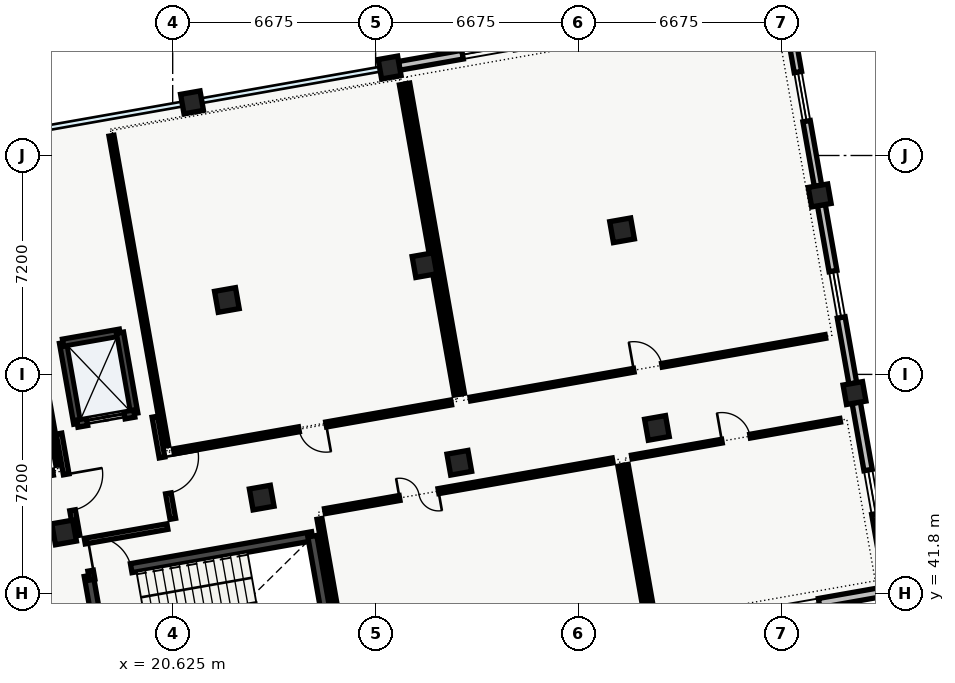
"""IFC4 building model, lengths in metres.
Left out: names, types, materials, properties, quantities, classifications, styles, units other than length and angle.
Written with IfcOpenShell. Run it as: python <this file> out.ifc"""

import sys

from ifc_helpers import new_model, si_unit, direction, frame, frame_2d, origin, origin_2d, place, context, subcontext, project, spatial, rectangle, extrude, element, fill, save


model = new_model("IFC4")
c1 = context("Model", 3, precision=1e-05, world=origin(), true_north=direction((0.0, 1.0)))
c2 = subcontext(c1, "Body", "Model", "MODEL_VIEW")
j1 = project(units=[si_unit("LENGTHUNIT", "METRE"), si_unit("PLANEANGLEUNIT", "RADIAN")], contexts=[c1])
p1 = place(None, origin())
s1 = spatial("IfcSite", under=j1, at=p1, CompositionType="ELEMENT")
p2 = place(p1, origin())
s2 = spatial("IfcBuilding", under=s1, at=p2, CompositionType="ELEMENT")
p3 = place(p2, frame((0.0, 0.0, 14.1)))
s3 = spatial("IfcBuildingStorey", under=s2, at=p3, CompositionType="ELEMENT", Elevation=14.1)
for number, where, z_axis, x_axis in (
    (1, (17.053, 43.802, 0.0), (0.0, 0.0, 1.0), (0.985, 0.174, 0.0)),
    (2, (23.553, 44.948, 0.0), (0.0, 0.0, 1.0), (0.985, 0.174, 0.0)),
    (3, (22.407, 51.448, 0.0), (0.0, 0.0, 1.0), (0.985, 0.174, 0.0)),
):
    element("IfcColumn", number, at=place(p3, frame(where, z_axis=z_axis, x_axis=x_axis)), inside=s3, PredefinedType="COLUMN", context=c2, shape_type="SweptSolid", body=[
        extrude(rectangle(XDim=0.7, YDim=0.7, at=origin_2d()), origin(), (0.0, 0.0, 1.0), 4.31),
    ])
p4 = place(p3, frame((21.261, 57.948, 0.0), z_axis=(0.0, 0.0, 1.0), x_axis=(0.984807753012, 0.173648177667, 0.0)))
e4 = element("IfcColumn", 4, at=p4, inside=s3, PredefinedType="COLUMN", context=c2, shape_type="SweptSolid", body=[
    extrude(rectangle(XDim=0.65, YDim=0.65, at=origin_2d()), origin(), (0.0, 0.0, 1.0), 4.31),
])
for number, where, z_axis, x_axis in (
    (5, (30.053, 46.094, 0.0), (0.0, 0.0, 1.0), (0.985, 0.174, 0.0)),
    (6, (28.907, 52.594, 0.0), (0.0, 0.0, 1.0), (0.985, 0.174, 0.0)),
):
    element("IfcColumn", number, at=place(p3, frame(where, z_axis=z_axis, x_axis=x_axis)), inside=s3, PredefinedType="COLUMN", context=c2, shape_type="SweptSolid", body=[
        extrude(rectangle(XDim=0.7, YDim=0.7, at=origin_2d()), origin(), (0.0, 0.0, 1.0), 4.31),
    ])
p5 = place(p3, frame((27.761, 59.094, 0.0), z_axis=(0.0, 0.0, 1.0), x_axis=(0.984807753012, 0.173648177667, 0.0)))
e7 = element("IfcColumn", 7, at=p5, inside=s3, PredefinedType="COLUMN", context=c2, shape_type="SweptSolid", body=[
    extrude(rectangle(XDim=0.65, YDim=0.65, at=origin_2d()), origin(), (0.0, 0.0, 1.0), 4.31),
])
for number, where, z_axis, x_axis in (
    (8, (36.552, 47.24, 0.0), (0.0, 0.0, 1.0), (0.985, 0.174, 0.0)),
    (9, (35.406, 53.74, 0.0), (0.0, 0.0, 1.0), (0.985, 0.174, 0.0)),
):
    element("IfcColumn", number, at=place(p3, frame(where, z_axis=z_axis, x_axis=x_axis)), inside=s3, PredefinedType="COLUMN", context=c2, shape_type="SweptSolid", body=[
        extrude(rectangle(XDim=0.7, YDim=0.7, at=origin_2d()), origin(), (0.0, 0.0, 1.0), 4.31),
    ])
for number, where, z_axis, x_axis in (
    (10, (43.052, 48.386, 0.0), (0.0, 0.0, 1.0), (0.985, 0.174, 0.0)),
    (11, (41.906, 54.886, 0.0), (0.0, 0.0, 1.0), (0.985, 0.174, 0.0)),
):
    element("IfcColumn", number, at=place(p3, frame(where, z_axis=z_axis, x_axis=x_axis)), inside=s3, PredefinedType="COLUMN", context=c2, shape_type="SweptSolid", body=[
        extrude(rectangle(XDim=0.65, YDim=0.65, at=origin_2d()), origin(), (0.0, 0.0, 1.0), 4.31),
    ])
p6 = place(p3, frame((28.076, 59.149, 0.0), z_axis=(0.0, 0.0, 1.0), x_axis=(0.98480829201, 0.173645120828, 0.0)))
e12 = element("IfcWall", 12, at=p6, inside=s3, PredefinedType="STANDARD", context=c2, shape_type="SweptSolid", body=[
    extrude(rectangle(XDim=5.96, YDim=0.29, at=frame_2d((2.98, 0.0))), origin(), (0.0, 0.0, 1.0), 3.795),
])
p7 = place(p6, frame((2.115, 0.0, 0.95)))
e13 = element("IfcOpeningElement", 13, at=p7, cuts=e12, PredefinedType="OPENING", context=c2, shape_type="SweptSolid", body=[
    extrude(rectangle(XDim=1.73, YDim=1.36, at=frame_2d((0.865, 0.68))), frame((0.0, 0.145, 0.0), z_axis=(0.0, -1.0, 0.0), x_axis=(1.0, 0.0, 0.0)), (0.0, 0.0, 1.0), 0.29),
])
p8 = place(p3, frame((40.816, 61.071, 0.0), z_axis=(0.0, 0.0, 1.0), x_axis=(0.173645120828, -0.98480829201, 0.0)))
e14 = element("IfcWall", 14, at=p8, inside=s3, PredefinedType="STANDARD", context=c2, shape_type="SweptSolid", body=[
    extrude(rectangle(XDim=5.96, YDim=0.245, at=frame_2d((2.98, 0.0))), origin(), (0.0, 0.0, 1.0), 3.795),
])
p9 = place(p8, frame((2.16, 0.0, 0.95)))
e15 = element("IfcOpeningElement", 15, at=p9, cuts=e14, PredefinedType="OPENING", context=c2, shape_type="SweptSolid", body=[
    extrude(rectangle(XDim=1.64, YDim=1.48, at=frame_2d((0.82, 0.74))), frame((0.0, 0.123, 0.0), z_axis=(0.0, -1.0, 0.0), x_axis=(1.0, 0.0, 0.0)), (0.0, 0.0, 1.0), 0.245),
])
p10 = place(p3, frame((41.962, 54.571, 0.0), z_axis=(0.0, 0.0, 1.0), x_axis=(0.173645120828, -0.98480829201, 0.0)))
e16 = element("IfcWall", 16, at=p10, inside=s3, PredefinedType="STANDARD", context=c2, shape_type="SweptSolid", body=[
    extrude(rectangle(XDim=5.96, YDim=0.26, at=frame_2d((2.98, 0.0))), origin(), (0.0, 0.0, 1.0), 3.795),
])
p11 = place(p10, frame((2.205, 0.0, 0.95)))
e17 = element("IfcOpeningElement", 17, at=p11, cuts=e16, PredefinedType="OPENING", context=c2, shape_type="SweptSolid", body=[
    extrude(rectangle(XDim=1.55, YDim=1.46, at=frame_2d((0.775, 0.73))), frame((0.0, 0.13, 0.0), z_axis=(0.0, -1.0, 0.0), x_axis=(1.0, 0.0, 0.0)), (0.0, 0.0, 1.0), 0.26),
])
p12 = place(p3, frame((43.108, 48.071, 0.0), z_axis=(0.0, 0.0, 1.0), x_axis=(0.173645120828, -0.98480829201, 0.0)))
e18 = element("IfcWall", 18, at=p12, inside=s3, PredefinedType="STANDARD", context=c2, shape_type="SweptSolid", body=[
    extrude(rectangle(XDim=5.96, YDim=0.275, at=frame_2d((2.98, 0.0))), origin(), (0.0, 0.0, 1.0), 3.795),
])
p13 = place(p12, frame((2.25, 0.0, 0.95)))
e19 = element("IfcOpeningElement", 19, at=p13, cuts=e18, PredefinedType="OPENING", context=c2, shape_type="SweptSolid", body=[
    extrude(rectangle(XDim=1.46, YDim=1.44, at=frame_2d((0.73, 0.72))), frame((0.0, 0.137, 0.0), z_axis=(0.0, -1.0, 0.0), x_axis=(1.0, 0.0, 0.0)), (0.0, 0.0, 1.0), 0.275),
])
p14 = place(p3, frame((43.883, 41.831, 0.0), z_axis=(0.0, 0.0, 1.0), x_axis=(-0.98480829201, -0.173645120828, 0.0)))
e20 = element("IfcWall", 20, at=p14, inside=s3, PredefinedType="STANDARD", context=c2, shape_type="SweptSolid", body=[
    extrude(rectangle(XDim=5.96, YDim=0.305, at=frame_2d((2.98, 0.0))), origin(), (0.0, 0.0, 1.0), 3.795),
])
p15 = place(p14, frame((2.025, 0.0, 0.95)))
e21 = element("IfcOpeningElement", 21, at=p15, cuts=e20, PredefinedType="OPENING", context=c2, shape_type="SweptSolid", body=[
    extrude(rectangle(XDim=1.91, YDim=1.4, at=frame_2d((0.955, 0.7))), frame((0.0, 0.152, 0.0), z_axis=(0.0, -1.0, 0.0), x_axis=(1.0, 0.0, 0.0)), (0.0, 0.0, 1.0), 0.305),
])
p16 = place(p3, frame((18.567, 38.383, 0.0), z_axis=(0.0, 0.0, 1.0), x_axis=(-0.173606946886, 0.984815022221, 0.0)))
e22 = element("IfcWall", 22, at=p16, inside=s3, PredefinedType="SHEAR", context=c2, shape_type="SweptSolid", body=[
    extrude(rectangle(XDim=4.06, YDim=0.3, at=frame_2d((2.03, 0.0))), origin(), (0.0, 0.0, 1.0), 4.28),
])
p17 = place(p3, frame((17.863, 42.381, 0.0), z_axis=(0.0, 0.0, 1.0), x_axis=(0.984808225754, 0.173645496596, 0.0)))
e23 = element("IfcWall", 23, at=p17, inside=s3, PredefinedType="SHEAR", context=c2, shape_type="SweptSolid", body=[
    extrude(rectangle(XDim=7.47, YDim=0.3, at=frame_2d((3.735, 0.0))), origin(), (0.0, 0.0, 1.0), 4.28),
])
p18 = place(p17, frame((0.18, 0.0, 0.0)))
e24 = element("IfcOpeningElement", 24, at=p18, cuts=e23, PredefinedType="OPENING", context=c2, shape_type="SweptSolid", body=[
    extrude(rectangle(XDim=1.24, YDim=2.15, at=frame_2d((0.62, 1.075))), frame((0.0, 0.15, 0.0), z_axis=(0.0, -1.0, 0.0), x_axis=(1.0, 0.0, 0.0)), (0.0, 0.0, 1.0), 0.3),
])
p19 = place(p3, frame((25.219, 43.678, 0.0), z_axis=(0.0, 0.0, 1.0), x_axis=(0.173665267602, -0.984804739443, 0.0)))
e25 = element("IfcWall", 25, at=p19, inside=s3, PredefinedType="SHEAR", context=c2, shape_type="SweptSolid", body=[
    extrude(rectangle(XDim=4.06, YDim=0.3, at=frame_2d((2.03, 0.0))), origin(), (0.0, 0.0, 1.0), 4.28),
])
p20 = place(p3, frame((17.488, 47.382, 0.0), z_axis=(0.0, 0.0, 1.0), x_axis=(-0.173615102578, 0.98481358447, 0.0)))
e26 = element("IfcWall", 26, at=p20, inside=s3, PredefinedType="SHEAR", context=c2, shape_type="SweptSolid", body=[
    extrude(rectangle(XDim=2.7, YDim=0.24, at=frame_2d((1.35, 0.0))), origin(), (0.0, 0.0, 1.0), 4.28),
])
p21 = place(p3, frame((17.02, 50.041, 0.0), z_axis=(0.0, 0.0, 1.0), x_axis=(0.984815882103, 0.173602068988, 0.0)))
e27 = element("IfcWall", 27, at=p21, inside=s3, PredefinedType="SHEAR", context=c2, shape_type="SweptSolid", body=[
    extrude(rectangle(XDim=1.9, YDim=0.24, at=frame_2d((0.95, 0.0))), origin(), (0.0, 0.0, 1.0), 4.28),
])
p22 = place(p3, frame((18.891, 50.371, 0.0), z_axis=(0.0, 0.0, 1.0), x_axis=(0.173615102578, -0.98481358447, 0.0)))
e28 = element("IfcWall", 28, at=p22, inside=s3, PredefinedType="SHEAR", context=c2, shape_type="SweptSolid", body=[
    extrude(rectangle(XDim=2.7, YDim=0.24, at=frame_2d((1.35, 0.0))), origin(), (0.0, 0.0, 1.0), 4.28),
])
p23 = place(p3, frame((19.359, 47.712, 0.0), z_axis=(0.0, 0.0, 1.0), x_axis=(-0.984815882103, -0.173602068988, 0.0)))
e29 = element("IfcWall", 29, at=p23, inside=s3, PredefinedType="SHEAR", context=c2, shape_type="SweptSolid", body=[
    extrude(rectangle(XDim=1.9, YDim=0.24, at=frame_2d((0.95, 0.0))), origin(), (0.0, 0.0, 1.0), 4.28),
])
p24 = place(p23, frame((0.325, 0.0, 0.0)))
e30 = element("IfcOpeningElement", 30, at=p24, cuts=e29, PredefinedType="OPENING", context=c2, shape_type="SweptSolid", body=[
    extrude(rectangle(XDim=1.25, YDim=2.2, at=frame_2d((0.625, 1.1))), frame((0.0, 0.12, 0.0), z_axis=(0.0, -1.0, 0.0), x_axis=(1.0, 0.0, 0.0)), (0.0, 0.0, 1.0), 0.24),
])
p25 = place(p3, frame((17.733, 43.516, 0.0), z_axis=(0.0, 0.0, 1.0), x_axis=(0.984808483292, 0.173644035992, 0.0)))
e31 = element("IfcWall", 31, at=p25, inside=s3, PredefinedType="SOLIDWALL", context=c2, shape_type="SweptSolid", body=[
    extrude(rectangle(XDim=2.76, YDim=0.185, at=frame_2d((1.38, 0.0))), origin(), (0.0, 0.0, 1.0), 3.95),
])
p26 = place(p3, frame((20.63, 44.25, 0.0), z_axis=(0.0, 0.0, 1.0), x_axis=(-0.173621956536, 0.984812376145, 0.0)))
e32 = element("IfcWall", 32, at=p26, inside=s3, PredefinedType="SOLIDWALL", context=c2, shape_type="SweptSolid", body=[
    extrude(rectangle(XDim=3.41, YDim=0.185, at=frame_2d((1.705, 0.0))), origin(), (0.0, 0.0, 1.0), 3.95),
])
p27 = place(p26, frame((0.85, 0.0, 0.0)))
e33 = element("IfcOpeningElement", 33, at=p27, cuts=e32, PredefinedType="OPENING", context=c2, shape_type="SweptSolid", body=[
    extrude(rectangle(XDim=1.2, YDim=2.15, at=frame_2d((0.6, 1.075))), frame((0.0, 0.093, 0.0), z_axis=(0.0, -1.0, 0.0), x_axis=(1.0, 0.0, 0.0)), (0.0, 0.0, 1.0), 0.185),
])
p28 = place(p3, frame((16.886, 47.052, 0.0), z_axis=(0.0, 0.0, 1.0), x_axis=(0.173621956536, -0.984812376145, 0.0)))
e34 = element("IfcWall", 34, at=p28, inside=s3, PredefinedType="SOLIDWALL", context=c2, shape_type="SweptSolid", body=[
    extrude(rectangle(XDim=3.41, YDim=0.185, at=frame_2d((1.705, 0.0))), origin(), (0.0, 0.0, 1.0), 3.95),
])
p29 = place(p28, frame((1.36, 0.0, 0.0)))
e35 = element("IfcOpeningElement", 35, at=p29, cuts=e34, PredefinedType="OPENING", context=c2, shape_type="SweptSolid", body=[
    extrude(rectangle(XDim=1.2, YDim=2.15, at=frame_2d((0.6, 1.075))), frame((0.0, 0.093, 0.0), z_axis=(0.0, -1.0, 0.0), x_axis=(1.0, 0.0, 0.0)), (0.0, 0.0, 1.0), 0.185),
])
p30 = place(p3, frame((12.59, 45.046, 0.0), z_axis=(0.0, 0.0, 1.0), x_axis=(0.984805411783, 0.173661454915, 0.0)))
e36 = element("IfcWall", 36, at=p30, inside=s3, PredefinedType="PARTITIONING", context=c2, shape_type="SweptSolid", body=[
    extrude(rectangle(XDim=4.16, YDim=0.165, at=frame_2d((2.08, 0.0))), origin(), (0.0, 0.0, 1.0), 3.895),
])
p31 = place(p30, frame((1.28, 0.0, 0.0)))
e37 = element("IfcOpeningElement", 37, at=p31, cuts=e36, PredefinedType="OPENING", context=c2, shape_type="SweptSolid", body=[
    extrude(rectangle(XDim=1.6, YDim=2.06, at=frame_2d((0.8, 1.03))), frame((0.0, 0.083, 0.0), z_axis=(0.0, -1.0, 0.0), x_axis=(1.0, 0.0, 0.0)), (0.0, 0.0, 1.0), 0.165),
])
p32 = place(p3, frame((16.865, 46.023, 0.0), z_axis=(0.0, 0.0, 1.0), x_axis=(-0.173632075677, 0.984810592092, 0.0)))
e38 = element("IfcWall", 38, at=p32, inside=s3, PredefinedType="PARTITIONING", context=c2, shape_type="SweptSolid", body=[
    extrude(rectangle(XDim=10.36, YDim=0.165, at=frame_2d((5.18, 0.0))), origin(), (0.0, 0.0, 1.0), 3.695),
])
p33 = place(p3, frame((20.665, 46.469, 0.0), z_axis=(0.0, 0.0, 1.0), x_axis=(0.984804784872, 0.173665009985, 0.0)))
e39 = element("IfcWall", 39, at=p33, inside=s3, PredefinedType="PARTITIONING", context=c2, shape_type="SweptSolid", body=[
    extrude(rectangle(XDim=9.26, YDim=0.165, at=frame_2d((4.63, 0.0))), origin(), (0.0, 0.0, 1.0), 3.895),
])
p34 = place(p33, frame((4.175, 0.0, 0.0)))
e40 = element("IfcOpeningElement", 40, at=p34, cuts=e39, PredefinedType="OPENING", context=c2, shape_type="SweptSolid", body=[
    extrude(rectangle(XDim=0.91, YDim=2.08, at=frame_2d((0.455, 1.04))), frame((0.0, 0.083, 0.0), z_axis=(0.0, -1.0, 0.0), x_axis=(1.0, 0.0, 0.0)), (0.0, 0.0, 1.0), 0.165),
])
p35 = place(p3, frame((29.963, 48.333, 0.0), z_axis=(0.0, 0.0, 1.0), x_axis=(-0.173658960975, 0.984805851563, 0.0)))
e41 = element("IfcWall", 41, at=p35, inside=s3, PredefinedType="PARTITIONING", context=c2, shape_type="SweptSolid", body=[
    extrude(rectangle(XDim=10.36, YDim=0.165, at=frame_2d((5.18, 0.0))), origin(), (0.0, 0.0, 1.0), 3.695),
])
p36 = place(p3, frame((18.611, 56.851, 0.0), z_axis=(0.0, 0.0, 1.0), x_axis=(0.173654930775, -0.984806562233, 0.0)))
e42 = element("IfcWall", 42, at=p36, inside=s3, PredefinedType="PARTITIONING", context=c2, shape_type="SweptSolid", body=[
    extrude(rectangle(XDim=10.36, YDim=0.165, at=frame_2d((5.18, 0.0))), origin(), (0.0, 0.0, 1.0), 3.95),
])
p37 = place(p3, frame((30.415, 48.189, 0.0), z_axis=(0.0, 0.0, 1.0), x_axis=(0.984810073067, 0.173635019467, 0.0)))
e43 = element("IfcWall", 43, at=p37, inside=s3, PredefinedType="PARTITIONING", context=c2, shape_type="SweptSolid", body=[
    extrude(rectangle(XDim=11.86, YDim=0.125, at=frame_2d((5.93, 0.0))), origin(), (0.0, 0.0, 1.0), 3.95),
])
p38 = place(p37, frame((5.46, 0.0, 0.0)))
e44 = element("IfcOpeningElement", 44, at=p38, cuts=e43, PredefinedType="OPENING", context=c2, shape_type="SweptSolid", body=[
    extrude(rectangle(XDim=0.94, YDim=2.12, at=frame_2d((0.47, 1.06))), frame((0.0, 0.062, 0.0), z_axis=(0.0, -1.0, 0.0), x_axis=(1.0, 0.0, 0.0)), (0.0, 0.0, 1.0), 0.125),
])
p39 = place(p3, frame((28.361, 58.57, 0.0), z_axis=(0.0, 0.0, 1.0), x_axis=(0.173632075677, -0.984810592092, 0.0)))
e45 = element("IfcWall", 45, at=p39, inside=s3, PredefinedType="PARTITIONING", context=c2, shape_type="SweptSolid", body=[
    extrude(rectangle(XDim=10.36, YDim=0.125, at=frame_2d((5.18, 0.0))), origin(), (0.0, 0.0, 1.0), 3.95),
])
p40 = place(p3, frame((36.212, 41.108, 0.0), z_axis=(0.0, 0.0, 1.0), x_axis=(-0.173611232021, 0.984814266812, 0.0)))
e46 = element("IfcWall", 46, at=p40, inside=s3, PredefinedType="PARTITIONING", context=c2, shape_type="SweptSolid", body=[
    extrude(rectangle(XDim=4.96, YDim=0.165, at=frame_2d((2.48, 0.0))), origin(), (0.0, 0.0, 1.0), 3.95),
])
p41 = place(p3, frame((35.096, 46.171, 0.0), z_axis=(0.0, 0.0, 1.0), x_axis=(-0.98480912325, -0.173640406486, 0.0)))
e47 = element("IfcWall", 47, at=p41, inside=s3, PredefinedType="PARTITIONING", context=c2, shape_type="SweptSolid", body=[
    extrude(rectangle(XDim=9.61, YDim=0.165, at=frame_2d((4.805, 0.0))), origin(), (0.0, 0.0, 1.0), 3.95),
])
p42 = place(p41, frame((5.817, 0.0, 0.0)))
e48 = element("IfcOpeningElement", 48, at=p42, cuts=e47, PredefinedType="OPENING", context=c2, shape_type="SweptSolid", body=[
    extrude(rectangle(XDim=1.3, YDim=2.18, at=frame_2d((0.65, 1.09))), frame((0.0, 0.083, 0.0), z_axis=(0.0, -1.0, 0.0), x_axis=(1.0, 0.0, 0.0)), (0.0, 0.0, 1.0), 0.165),
])
p43 = place(p3, frame((25.454, 44.247, 0.0), z_axis=(0.0, 0.0, 1.0), x_axis=(0.173658971256, -0.98480584975, 0.0)))
e49 = element("IfcWall", 49, at=p43, inside=s3, PredefinedType="PARTITIONING", context=c2, shape_type="SweptSolid", body=[
    extrude(rectangle(XDim=4.96, YDim=0.165, at=frame_2d((2.48, 0.0))), origin(), (0.0, 0.0, 1.0), 3.95),
])
p44 = place(p3, frame((42.581, 47.491, 0.0), z_axis=(0.0, 0.0, 1.0), x_axis=(-0.984804033539, -0.173669270527, 0.0)))
e50 = element("IfcWall", 50, at=p44, inside=s3, PredefinedType="PARTITIONING", context=c2, shape_type="SweptSolid", body=[
    extrude(rectangle(XDim=6.96, YDim=0.125, at=frame_2d((3.48, 0.0))), origin(), (0.0, 0.0, 1.0), 3.95),
])
p45 = place(p44, frame((3.01, 0.0, 0.0)))
e51 = element("IfcOpeningElement", 51, at=p45, cuts=e50, PredefinedType="OPENING", context=c2, shape_type="SweptSolid", body=[
    extrude(rectangle(XDim=0.94, YDim=2.12, at=frame_2d((0.47, 1.06))), frame((0.0, 0.062, 0.0), z_axis=(0.0, -1.0, 0.0), x_axis=(1.0, 0.0, 0.0)), (0.0, 0.0, 1.0), 0.125),
])
p46 = place(p3, frame((35.548, 46.027, 0.0), z_axis=(0.0, 0.0, 1.0), x_axis=(0.173650553511, -0.984807334084, 0.0)))
e52 = element("IfcWall", 52, at=p46, inside=s3, PredefinedType="PARTITIONING", context=c2, shape_type="SweptSolid", body=[
    extrude(rectangle(XDim=4.96, YDim=0.125, at=frame_2d((2.48, 0.0))), origin(), (0.0, 0.0, 1.0), 3.95),
])
p47 = place(p7, origin())
e53 = element("IfcWindow", 53, at=p47, inside=s3, PartitioningType="SINGLE_PANEL", PredefinedType="WINDOW", context=c2, shape_type="SweptSolid", body=[
    extrude(rectangle(XDim=1.73, YDim=1.36, at=frame_2d((0.865, 0.68))), frame((0.0, 0.03, 0.0), z_axis=(0.0, -1.0, 0.0), x_axis=(1.0, 0.0, 0.0)), (0.0, 0.0, 1.0), 0.06),
])
fill(e13, e53)
p48 = place(p9, origin())
e54 = element("IfcWindow", 54, at=p48, inside=s3, PartitioningType="SINGLE_PANEL", PredefinedType="WINDOW", context=c2, shape_type="SweptSolid", body=[
    extrude(rectangle(XDim=1.64, YDim=1.48, at=frame_2d((0.82, 0.74))), frame((0.0, 0.03, 0.0), z_axis=(0.0, -1.0, 0.0), x_axis=(1.0, 0.0, 0.0)), (0.0, 0.0, 1.0), 0.06),
])
fill(e15, e54)
p49 = place(p11, origin())
e55 = element("IfcWindow", 55, at=p49, inside=s3, PartitioningType="SINGLE_PANEL", PredefinedType="WINDOW", context=c2, shape_type="SweptSolid", body=[
    extrude(rectangle(XDim=1.55, YDim=1.46, at=frame_2d((0.775, 0.73))), frame((0.0, 0.03, 0.0), z_axis=(0.0, -1.0, 0.0), x_axis=(1.0, 0.0, 0.0)), (0.0, 0.0, 1.0), 0.06),
])
fill(e17, e55)
p50 = place(p13, origin())
e56 = element("IfcWindow", 56, at=p50, inside=s3, PartitioningType="SINGLE_PANEL", PredefinedType="WINDOW", context=c2, shape_type="SweptSolid", body=[
    extrude(rectangle(XDim=1.46, YDim=1.44, at=frame_2d((0.73, 0.72))), frame((0.0, 0.03, 0.0), z_axis=(0.0, -1.0, 0.0), x_axis=(1.0, 0.0, 0.0)), (0.0, 0.0, 1.0), 0.06),
])
fill(e19, e56)
p51 = place(p15, origin())
e57 = element("IfcWindow", 57, at=p51, inside=s3, PartitioningType="SINGLE_PANEL", PredefinedType="WINDOW", context=c2, shape_type="SweptSolid", body=[
    extrude(rectangle(XDim=1.91, YDim=1.4, at=frame_2d((0.955, 0.7))), frame((0.0, 0.03, 0.0), z_axis=(0.0, -1.0, 0.0), x_axis=(1.0, 0.0, 0.0)), (0.0, 0.0, 1.0), 0.06),
])
fill(e21, e57)
p52 = place(p18, origin())
e58 = element("IfcDoor", 58, at=p52, inside=s3, OperationType="SINGLE_SWING_LEFT", PredefinedType="DOOR", context=c2, shape_type="SweptSolid", body=[
    extrude(rectangle(XDim=1.24, YDim=2.15, at=frame_2d((0.62, 1.075))), frame((0.0, 0.025, 0.0), z_axis=(0.0, -1.0, 0.0), x_axis=(1.0, 0.0, 0.0)), (0.0, 0.0, 1.0), 0.05),
])
fill(e24, e58)
p53 = place(p24, origin())
e59 = element("IfcDoor", 59, at=p53, inside=s3, OperationType="SLIDING_TO_RIGHT", PredefinedType="DOOR", context=c2, shape_type="SweptSolid", body=[
    extrude(rectangle(XDim=1.25, YDim=2.2, at=frame_2d((0.625, 1.1))), frame((0.0, 0.025, 0.0), z_axis=(0.0, -1.0, 0.0), x_axis=(1.0, 0.0, 0.0)), (0.0, 0.0, 1.0), 0.05),
])
fill(e30, e59)
p54 = place(p27, origin())
e60 = element("IfcDoor", 60, at=p54, inside=s3, OperationType="SINGLE_SWING_RIGHT", PredefinedType="DOOR", context=c2, shape_type="SweptSolid", body=[
    extrude(rectangle(XDim=1.2, YDim=2.15, at=frame_2d((0.6, 1.075))), frame((0.0, 0.025, 0.0), z_axis=(0.0, -1.0, 0.0), x_axis=(1.0, 0.0, 0.0)), (0.0, 0.0, 1.0), 0.05),
])
fill(e33, e60)
p55 = place(p29, origin())
e61 = element("IfcDoor", 61, at=p55, inside=s3, OperationType="SINGLE_SWING_LEFT", PredefinedType="DOOR", context=c2, shape_type="SweptSolid", body=[
    extrude(rectangle(XDim=1.2, YDim=2.15, at=frame_2d((0.6, 1.075))), frame((0.0, 0.025, 0.0), z_axis=(0.0, -1.0, 0.0), x_axis=(1.0, 0.0, 0.0)), (0.0, 0.0, 1.0), 0.05),
])
fill(e35, e61)
p56 = place(p34, origin())
e62 = element("IfcDoor", 62, at=p56, inside=s3, OperationType="SINGLE_SWING_RIGHT", PredefinedType="DOOR", context=c2, shape_type="SweptSolid", body=[
    extrude(rectangle(XDim=0.91, YDim=2.08, at=frame_2d((0.455, 1.04))), frame((0.0, 0.025, 0.0), z_axis=(0.0, -1.0, 0.0), x_axis=(1.0, 0.0, 0.0)), (0.0, 0.0, 1.0), 0.05),
])
fill(e40, e62)
p57 = place(p38, origin())
e63 = element("IfcDoor", 63, at=p57, inside=s3, OperationType="SINGLE_SWING_LEFT", PredefinedType="DOOR", context=c2, shape_type="SweptSolid", body=[
    extrude(rectangle(XDim=0.94, YDim=2.12, at=frame_2d((0.47, 1.06))), frame((0.0, 0.025, 0.0), z_axis=(0.0, -1.0, 0.0), x_axis=(1.0, 0.0, 0.0)), (0.0, 0.0, 1.0), 0.05),
])
fill(e44, e63)
p58 = place(p42, origin())
e64 = element("IfcDoor", 64, at=p58, inside=s3, OperationType="DOUBLE_DOOR_SINGLE_SWING", PredefinedType="DOOR", context=c2, shape_type="SweptSolid", body=[
    extrude(rectangle(XDim=1.3, YDim=2.18, at=frame_2d((0.65, 1.09))), frame((0.0, 0.025, 0.0), z_axis=(0.0, -1.0, 0.0), x_axis=(1.0, 0.0, 0.0)), (0.0, 0.0, 1.0), 0.05),
])
fill(e48, e64)
p59 = place(p45, origin())
e65 = element("IfcDoor", 65, at=p59, inside=s3, OperationType="SINGLE_SWING_RIGHT", PredefinedType="DOOR", context=c2, shape_type="SweptSolid", body=[
    extrude(rectangle(XDim=0.94, YDim=2.12, at=frame_2d((0.47, 1.06))), frame((0.0, 0.025, 0.0), z_axis=(0.0, -1.0, 0.0), x_axis=(1.0, 0.0, 0.0)), (0.0, 0.0, 1.0), 0.05),
])
fill(e51, e65)
save(model, sys.argv[1])
